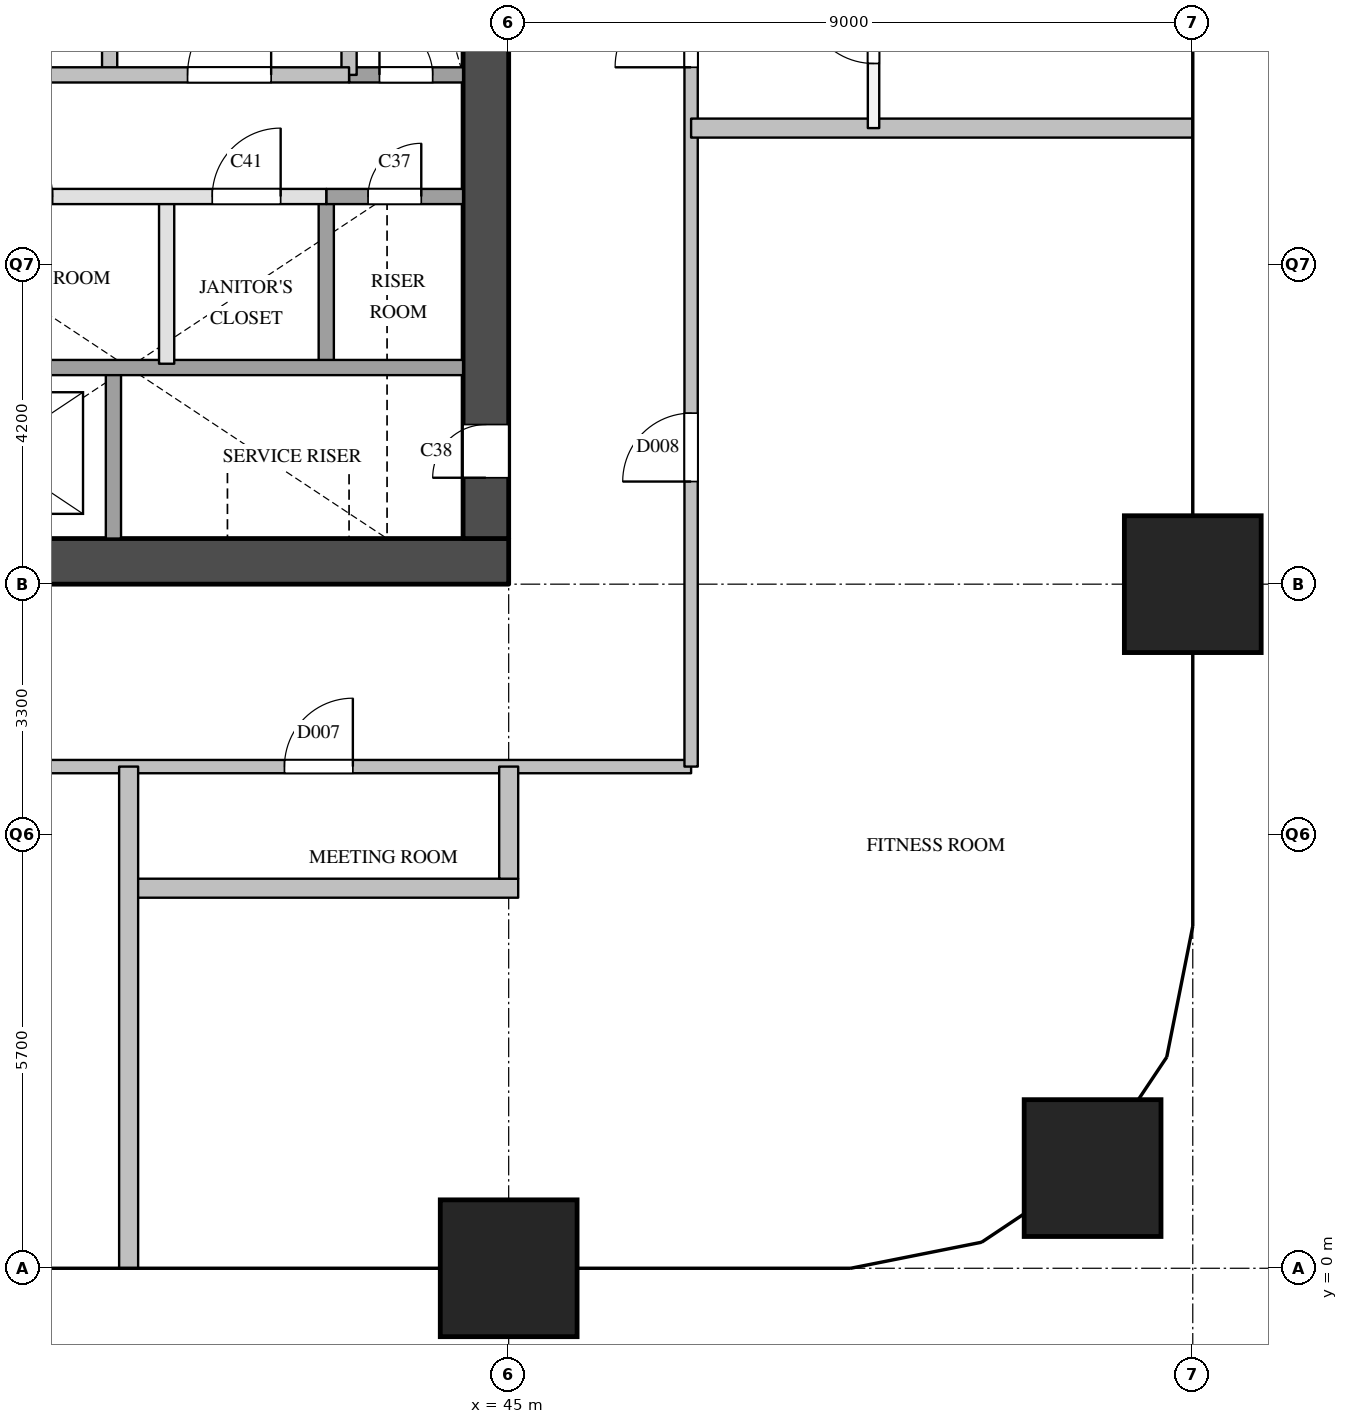
"""IFC4 building model, lengths in metres.
Left out: names, types, materials, properties, quantities, classifications, styles, units other than length and angle.
Written with IfcOpenShell. Run it as: python <this file> out.ifc"""

import sys

from ifc_helpers import new_model, si_unit, direction, frame, frame_2d, origin, origin_2d, place, context, subcontext, project, spatial, rectangle, extrude, element, fill, save


model = new_model("IFC4")
c1 = context("Model", 3, precision=1e-05, world=origin(), true_north=direction((0.0, 1.0)))
c2 = subcontext(c1, "Body", "Model", "MODEL_VIEW")
j1 = project(units=[si_unit("LENGTHUNIT", "METRE"), si_unit("PLANEANGLEUNIT", "RADIAN")], contexts=[c1])
p1 = place(None, origin())
s1 = spatial("IfcSite", under=j1, at=p1, CompositionType="ELEMENT")
p2 = place(p1, origin())
s2 = spatial("IfcBuilding", under=s1, at=p2, CompositionType="ELEMENT")
p3 = place(p2, frame((0.0, 0.0, 50.0)))
s3 = spatial("IfcBuildingStorey", under=s2, at=p3, CompositionType="ELEMENT", Elevation=50.0)
for number, where, z_axis, x_axis in (
    (1, (45.0, 0.0, 0.0), (0.0, 0.0, 1.0), (1.0, 0.0, 0.0)),
    (2, (52.682, 1.318, 0.0), (0.0, 0.0, 1.0), (1.0, 0.0, 0.0)),
    (3, (54.0, 9.0, 0.0), (0.0, 0.0, 1.0), (1.0, 0.0, 0.0)),
):
    element("IfcColumn", number, at=place(p3, frame(where, z_axis=z_axis, x_axis=x_axis)), inside=s3, PredefinedType="COLUMN", context=c2, shape_type="SweptSolid", body=[
        extrude(rectangle(XDim=1.8, YDim=1.8, at=origin_2d()), origin(), (0.0, 0.0, 1.0), 3.8),
    ])
p4 = place(p3, frame((36.0, 9.3, 0.0), z_axis=(0.0, 0.0, 1.0), x_axis=(1.0, 0.0, 0.0)))
e4 = element("IfcWall", 4, at=p4, inside=s3, PredefinedType="SHEAR", context=c2, shape_type="SweptSolid", body=[
    extrude(rectangle(XDim=9.0, YDim=0.6, at=frame_2d((4.5, 0.0))), origin(), (0.0, 0.0, 1.0), 3.5),
])
p5 = place(p3, frame((44.7, 9.6, 0.0), z_axis=(0.0, 0.0, 1.0), x_axis=(0.0, 1.0, 0.0)))
e5 = element("IfcWall", 5, at=p5, inside=s3, PredefinedType="SHEAR", context=c2, shape_type="SweptSolid", body=[
    extrude(rectangle(XDim=12.3, YDim=0.6, at=frame_2d((6.15, 0.0))), origin(), (0.0, 0.0, 1.0), 3.5),
])
p6 = place(p5, frame((0.8, 0.0, 0.0)))
e6 = element("IfcOpeningElement", 6, at=p6, cuts=e5, PredefinedType="OPENING", context=c2, shape_type="SweptSolid", body=[
    extrude(rectangle(XDim=0.7, YDim=2.1, at=frame_2d((0.35, 1.05))), frame((0.0, 0.31, 0.0), z_axis=(0.0, -1.0, 0.0), x_axis=(1.0, 0.0, 0.0)), (0.0, 0.0, 1.0), 0.62),
])
p7 = place(p3, frame((39.75, 15.7, 0.0), z_axis=(0.0, 0.0, 1.0), x_axis=(0.0, 1.0, 0.0)))
e7 = element("IfcWall", 7, at=p7, inside=s3, PredefinedType="SOLIDWALL", context=c2, shape_type="SweptSolid", body=[
    extrude(rectangle(XDim=4.3, YDim=0.2, at=frame_2d((2.15, 0.0))), origin(), (0.0, 0.0, 1.0), 3.5),
])
p8 = place(p3, frame((39.8, 9.6, 0.0), z_axis=(0.0, 0.0, 1.0), x_axis=(0.0, 1.0, 0.0)))
e8 = element("IfcWall", 8, at=p8, inside=s3, PredefinedType="SOLIDWALL", context=c2, shape_type="SweptSolid", body=[
    extrude(rectangle(XDim=2.3, YDim=0.2, at=frame_2d((1.15, 0.0))), origin(), (0.0, 0.0, 1.0), 3.5),
])
p9 = place(p3, frame((40.5, 11.9, 0.0), z_axis=(0.0, 0.0, 1.0), x_axis=(0.0, 1.0, 0.0)))
e9 = element("IfcWall", 9, at=p9, inside=s3, PredefinedType="PARTITIONING", context=c2, shape_type="SweptSolid", body=[
    extrude(rectangle(XDim=2.2, YDim=0.2, at=frame_2d((1.1, 0.0))), origin(), (0.0, 0.0, 1.0), 3.5),
])
p10 = place(p3, frame((42.6, 11.9, 0.0), z_axis=(0.0, 0.0, 1.0), x_axis=(0.0, 1.0, 0.0)))
e10 = element("IfcWall", 10, at=p10, inside=s3, PredefinedType="SOLIDWALL", context=c2, shape_type="SweptSolid", body=[
    extrude(rectangle(XDim=2.2, YDim=0.2, at=frame_2d((1.1, 0.0))), origin(), (0.0, 0.0, 1.0), 3.5),
])
p11 = place(p3, frame((42.9, 15.7, 0.0), z_axis=(0.0, 0.0, 1.0), x_axis=(0.0, 1.0, 0.0)))
e11 = element("IfcWall", 11, at=p11, inside=s3, PredefinedType="SOLIDWALL", context=c2, shape_type="SweptSolid", body=[
    extrude(rectangle(XDim=4.3, YDim=0.2, at=frame_2d((2.15, 0.0))), origin(), (0.0, 0.0, 1.0), 3.5),
])
p12 = place(p3, frame((36.6, 11.85, 0.0), z_axis=(0.0, 0.0, 1.0), x_axis=(1.0, 0.0, 0.0)))
e12 = element("IfcWall", 12, at=p12, inside=s3, PredefinedType="SOLIDWALL", context=c2, shape_type="SweptSolid", body=[
    extrude(rectangle(XDim=7.8, YDim=0.2, at=frame_2d((3.9, 0.0))), origin(), (0.0, 0.0, 1.0), 3.5),
])
p13 = place(p3, frame((36.6, 14.1, 0.0), z_axis=(0.0, 0.0, 1.0), x_axis=(1.0, 0.0, 0.0)))
e13 = element("IfcWall", 13, at=p13, inside=s3, PredefinedType="PARTITIONING", context=c2, shape_type="SweptSolid", body=[
    extrude(rectangle(XDim=6.0, YDim=0.2, at=frame_2d((3.0, 0.0))), origin(), (0.0, 0.0, 1.0), 3.5),
])
p14 = place(p13, frame((1.5, 0.0, 0.0)))
e14 = element("IfcOpeningElement", 14, at=p14, cuts=e13, PredefinedType="OPENING", context=c2, shape_type="SweptSolid", body=[
    extrude(rectangle(XDim=0.9, YDim=2.1, at=frame_2d((0.45, 1.05))), frame((0.0, 0.11, 0.0), z_axis=(0.0, -1.0, 0.0), x_axis=(1.0, 0.0, 0.0)), (0.0, 0.0, 1.0), 0.22),
])
p15 = place(p13, frame((4.5, 0.0, 0.0)))
e15 = element("IfcOpeningElement", 15, at=p15, cuts=e13, PredefinedType="OPENING", context=c2, shape_type="SweptSolid", body=[
    extrude(rectangle(XDim=0.9, YDim=2.1, at=frame_2d((0.45, 1.05))), frame((0.0, 0.11, 0.0), z_axis=(0.0, -1.0, 0.0), x_axis=(1.0, 0.0, 0.0)), (0.0, 0.0, 1.0), 0.22),
])
p16 = place(p3, frame((42.6, 14.1, 0.0), z_axis=(0.0, 0.0, 1.0), x_axis=(1.0, 0.0, 0.0)))
e16 = element("IfcWall", 16, at=p16, inside=s3, PredefinedType="SOLIDWALL", context=c2, shape_type="SweptSolid", body=[
    extrude(rectangle(XDim=1.8, YDim=0.2, at=frame_2d((0.9, 0.0))), origin(), (0.0, 0.0, 1.0), 3.5),
])
p17 = place(p16, frame((0.55, 0.0, 0.0)))
e17 = element("IfcOpeningElement", 17, at=p17, cuts=e16, PredefinedType="OPENING", context=c2, shape_type="SweptSolid", body=[
    extrude(rectangle(XDim=0.7, YDim=2.1, at=frame_2d((0.35, 1.05))), frame((0.0, 0.11, 0.0), z_axis=(0.0, -1.0, 0.0), x_axis=(1.0, 0.0, 0.0)), (0.0, 0.0, 1.0), 0.22),
])
p18 = place(p3, frame((42.9, 15.7, 0.0), z_axis=(0.0, 0.0, 1.0), x_axis=(1.0, 0.0, 0.0)))
e18 = element("IfcWall", 18, at=p18, inside=s3, PredefinedType="SOLIDWALL", context=c2, shape_type="SweptSolid", body=[
    extrude(rectangle(XDim=1.5, YDim=0.2, at=frame_2d((0.75, 0.0))), origin(), (0.0, 0.0, 1.0), 3.5),
])
p19 = place(p18, frame((0.4, 0.0, 0.0)))
e19 = element("IfcOpeningElement", 19, at=p19, cuts=e18, PredefinedType="OPENING", context=c2, shape_type="SweptSolid", body=[
    extrude(rectangle(XDim=0.7, YDim=2.1, at=frame_2d((0.35, 1.05))), frame((0.0, 0.11, 0.0), z_axis=(0.0, -1.0, 0.0), x_axis=(1.0, 0.0, 0.0)), (0.0, 0.0, 1.0), 0.22),
])
p20 = place(p3, frame((36.6, 15.7, 0.0), z_axis=(0.0, 0.0, 1.0), x_axis=(1.0, 0.0, 0.0)))
e20 = element("IfcWall", 20, at=p20, inside=s3, PredefinedType="SOLIDWALL", context=c2, shape_type="SweptSolid", body=[
    extrude(rectangle(XDim=6.3, YDim=0.2, at=frame_2d((3.15, 0.0))), origin(), (0.0, 0.0, 1.0), 3.5),
])
p21 = place(p20, frame((1.025, 0.0, 0.0)))
e21 = element("IfcOpeningElement", 21, at=p21, cuts=e20, PredefinedType="OPENING", context=c2, shape_type="SweptSolid", body=[
    extrude(rectangle(XDim=1.1, YDim=2.1, at=frame_2d((0.55, 1.05))), frame((0.0, 0.11, 0.0), z_axis=(0.0, -1.0, 0.0), x_axis=(1.0, 0.0, 0.0)), (0.0, 0.0, 1.0), 0.22),
])
p22 = place(p20, frame((4.175, 0.0, 0.0)))
e22 = element("IfcOpeningElement", 22, at=p22, cuts=e20, PredefinedType="OPENING", context=c2, shape_type="SweptSolid", body=[
    extrude(rectangle(XDim=1.1, YDim=2.1, at=frame_2d((0.55, 1.05))), frame((0.0, 0.11, 0.0), z_axis=(0.0, -1.0, 0.0), x_axis=(1.0, 0.0, 0.0)), (0.0, 0.0, 1.0), 0.22),
])
p23 = place(p3, frame((33.6, 6.6, 0.0), z_axis=(0.0, 0.0, 1.0), x_axis=(1.0, 0.0, 0.0)))
e23 = element("IfcWall", 23, at=p23, inside=s3, PredefinedType="PARTITIONING", context=c2, shape_type="SweptSolid", body=[
    extrude(rectangle(XDim=13.8, YDim=0.175, at=frame_2d((6.9, 0.0))), origin(), (0.0, 0.0, 1.0), 3.5),
])
p24 = place(p23, frame((8.45, 0.0, 0.0)))
e24 = element("IfcOpeningElement", 24, at=p24, cuts=e23, PredefinedType="OPENING", context=c2, shape_type="SweptSolid", body=[
    extrude(rectangle(XDim=0.9, YDim=2.1, at=frame_2d((0.45, 1.05))), frame((0.0, 0.097, 0.0), z_axis=(0.0, -1.0, 0.0), x_axis=(1.0, 0.0, 0.0)), (0.0, 0.0, 1.0), 0.195),
])
p25 = place(p3, frame((47.4, 6.6, 0.0), z_axis=(0.0, 0.0, 1.0), x_axis=(0.0, 1.0, 0.0)))
e25 = element("IfcWall", 25, at=p25, inside=s3, PredefinedType="PARTITIONING", context=c2, shape_type="SweptSolid", body=[
    extrude(rectangle(XDim=18.3, YDim=0.175, at=frame_2d((9.15, 0.0))), origin(), (0.0, 0.0, 1.0), 3.5),
])
p26 = place(p25, frame((3.75, 0.0, 0.0)))
e26 = element("IfcOpeningElement", 26, at=p26, cuts=e25, PredefinedType="OPENING", context=c2, shape_type="SweptSolid", body=[
    extrude(rectangle(XDim=0.9, YDim=2.1, at=frame_2d((0.45, 1.05))), frame((0.0, 0.097, 0.0), z_axis=(0.0, -1.0, 0.0), x_axis=(1.0, 0.0, 0.0)), (0.0, 0.0, 1.0), 0.195),
])
p27 = place(p25, frame((9.2, 0.0, 0.0)))
e27 = element("IfcOpeningElement", 27, at=p27, cuts=e25, PredefinedType="OPENING", context=c2, shape_type="SweptSolid", body=[
    extrude(rectangle(XDim=1.0, YDim=2.1, at=frame_2d((0.5, 1.05))), frame((0.0, 0.097, 0.0), z_axis=(0.0, -1.0, 0.0), x_axis=(1.0, 0.0, 0.0)), (0.0, 0.0, 1.0), 0.195),
])
p28 = place(p25, frame((15.4, 0.0, 0.0)))
e28 = element("IfcOpeningElement", 28, at=p28, cuts=e25, PredefinedType="OPENING", context=c2, shape_type="SweptSolid", body=[
    extrude(rectangle(XDim=0.9, YDim=2.1, at=frame_2d((0.45, 1.05))), frame((0.0, 0.097, 0.0), z_axis=(0.0, -1.0, 0.0), x_axis=(1.0, 0.0, 0.0)), (0.0, 0.0, 1.0), 0.195),
])
p29 = place(p3, frame((49.8, 15.0, 0.0), z_axis=(0.0, 0.0, 1.0), x_axis=(0.0, 1.0, 0.0)))
e29 = element("IfcWall", 29, at=p29, inside=s3, PredefinedType="PARTITIONING", context=c2, shape_type="SweptSolid", body=[
    extrude(rectangle(XDim=2.6, YDim=0.15, at=frame_2d((1.3, 0.0))), origin(), (0.0, 0.0, 1.0), 3.5),
])
p30 = place(p29, frame((0.85, 0.0, 0.0)))
e30 = element("IfcOpeningElement", 30, at=p30, cuts=e29, PredefinedType="OPENING", context=c2, shape_type="SweptSolid", body=[
    extrude(rectangle(XDim=0.9, YDim=2.1, at=frame_2d((0.45, 1.05))), frame((0.0, 0.085, 0.0), z_axis=(0.0, -1.0, 0.0), x_axis=(1.0, 0.0, 0.0)), (0.0, 0.0, 1.0), 0.17),
])
p31 = place(p3, frame((40.0, 5.0, 0.0), z_axis=(0.0, 0.0, 1.0), x_axis=(1.0, 0.0, 0.0)))
e31 = element("IfcWall", 31, at=p31, inside=s3, PredefinedType="PARTITIONING", context=c2, shape_type="SweptSolid", body=[
    extrude(rectangle(XDim=5.125, YDim=0.25, at=frame_2d((2.562, 0.0))), origin(), (0.0, 0.0, 1.0), 3.5),
])
for number, where, z_axis, x_axis in (
    (32, (47.4, 15.0, 0.0), (0.0, 0.0, 1.0), (1.0, 0.0, 0.0)),
    (33, (40.0, 0.0, 0.0), (0.0, 0.0, 1.0), (0.0, 1.0, 0.0)),
):
    element("IfcWall", number, at=place(p3, frame(where, z_axis=z_axis, x_axis=x_axis)), inside=s3, PredefinedType="PARTITIONING", context=c2, shape_type="SweptSolid", body=[
        extrude(rectangle(XDim=6.6, YDim=0.25, at=frame_2d((3.3, 0.0))), origin(), (0.0, 0.0, 1.0), 2.5),
    ])
p32 = place(p3, frame((45.0, 5.125, 0.0), z_axis=(0.0, 0.0, 1.0), x_axis=(0.0, 1.0, 0.0)))
e34 = element("IfcWall", 34, at=p32, inside=s3, PredefinedType="PARTITIONING", context=c2, shape_type="SweptSolid", body=[
    extrude(rectangle(XDim=1.475, YDim=0.25, at=frame_2d((0.738, 0.0))), origin(), (0.0, 0.0, 1.0), 3.5),
])
p33 = place(p22, origin())
e35 = element("IfcDoor", 35, at=p33, inside=s3, OperationType="SINGLE_SWING_RIGHT", PredefinedType="DOOR", context=c2, shape_type="SweptSolid", body=[
    extrude(rectangle(XDim=1.1, YDim=2.1, at=frame_2d((0.55, 1.05))), frame((0.0, 0.025, 0.0), z_axis=(0.0, -1.0, 0.0), x_axis=(1.0, 0.0, 0.0)), (0.0, 0.0, 1.0), 0.05),
])
fill(e22, e35)
p34 = place(p19, origin())
e36 = element("IfcDoor", 36, at=p34, inside=s3, OperationType="SINGLE_SWING_LEFT", PredefinedType="DOOR", context=c2, shape_type="SweptSolid", body=[
    extrude(rectangle(XDim=0.7, YDim=2.1, at=frame_2d((0.35, 1.05))), frame((0.0, 0.025, 0.0), z_axis=(0.0, -1.0, 0.0), x_axis=(1.0, 0.0, 0.0)), (0.0, 0.0, 1.0), 0.05),
])
fill(e19, e36)
p35 = place(p17, origin())
e37 = element("IfcDoor", 37, at=p35, inside=s3, OperationType="SINGLE_SWING_RIGHT", PredefinedType="DOOR", context=c2, shape_type="SweptSolid", body=[
    extrude(rectangle(XDim=0.7, YDim=2.1, at=frame_2d((0.35, 1.05))), frame((0.0, 0.025, 0.0), z_axis=(0.0, -1.0, 0.0), x_axis=(1.0, 0.0, 0.0)), (0.0, 0.0, 1.0), 0.05),
])
fill(e17, e37)
p36 = place(p6, origin())
e38 = element("IfcDoor", 38, at=p36, inside=s3, OperationType="SINGLE_SWING_LEFT", PredefinedType="DOOR", context=c2, shape_type="SweptSolid", body=[
    extrude(rectangle(XDim=0.7, YDim=2.1, at=frame_2d((0.35, 1.05))), frame((0.0, 0.025, 0.0), z_axis=(0.0, -1.0, 0.0), x_axis=(1.0, 0.0, 0.0)), (0.0, 0.0, 1.0), 0.05),
])
fill(e6, e38)
p37 = place(p15, origin())
e39 = element("IfcDoor", 39, at=p37, inside=s3, OperationType="SINGLE_SWING_RIGHT", PredefinedType="DOOR", context=c2, shape_type="SweptSolid", body=[
    extrude(rectangle(XDim=0.9, YDim=2.1, at=frame_2d((0.45, 1.05))), frame((0.0, 0.025, 0.0), z_axis=(0.0, -1.0, 0.0), x_axis=(1.0, 0.0, 0.0)), (0.0, 0.0, 1.0), 0.05),
])
fill(e15, e39)
p38 = place(p24, origin())
e40 = element("IfcDoor", 40, at=p38, inside=s3, OperationType="SINGLE_SWING_RIGHT", PredefinedType="DOOR", context=c2, shape_type="SweptSolid", body=[
    extrude(rectangle(XDim=0.9, YDim=2.1, at=frame_2d((0.45, 1.05))), frame((0.0, 0.025, 0.0), z_axis=(0.0, -1.0, 0.0), x_axis=(1.0, 0.0, 0.0)), (0.0, 0.0, 1.0), 0.05),
])
fill(e24, e40)
p39 = place(p26, origin())
e41 = element("IfcDoor", 41, at=p39, inside=s3, OperationType="SINGLE_SWING_LEFT", PredefinedType="DOOR", context=c2, shape_type="SweptSolid", body=[
    extrude(rectangle(XDim=0.9, YDim=2.1, at=frame_2d((0.45, 1.05))), frame((0.0, 0.025, 0.0), z_axis=(0.0, -1.0, 0.0), x_axis=(1.0, 0.0, 0.0)), (0.0, 0.0, 1.0), 0.05),
])
fill(e26, e41)
p40 = place(p27, origin())
e42 = element("IfcDoor", 42, at=p40, inside=s3, OperationType="SINGLE_SWING_LEFT", PredefinedType="DOOR", context=c2, shape_type="SweptSolid", body=[
    extrude(rectangle(XDim=1.0, YDim=2.1, at=frame_2d((0.5, 1.05))), frame((0.0, 0.025, 0.0), z_axis=(0.0, -1.0, 0.0), x_axis=(1.0, 0.0, 0.0)), (0.0, 0.0, 1.0), 0.05),
])
fill(e27, e42)
p41 = place(p30, origin())
e43 = element("IfcDoor", 43, at=p41, inside=s3, OperationType="SINGLE_SWING_RIGHT", PredefinedType="DOOR", context=c2, shape_type="SweptSolid", body=[
    extrude(rectangle(XDim=0.9, YDim=2.1, at=frame_2d((0.45, 1.05))), frame((0.0, 0.025, 0.0), z_axis=(0.0, -1.0, 0.0), x_axis=(1.0, 0.0, 0.0)), (0.0, 0.0, 1.0), 0.05),
])
fill(e30, e43)
save(model, sys.argv[1])
